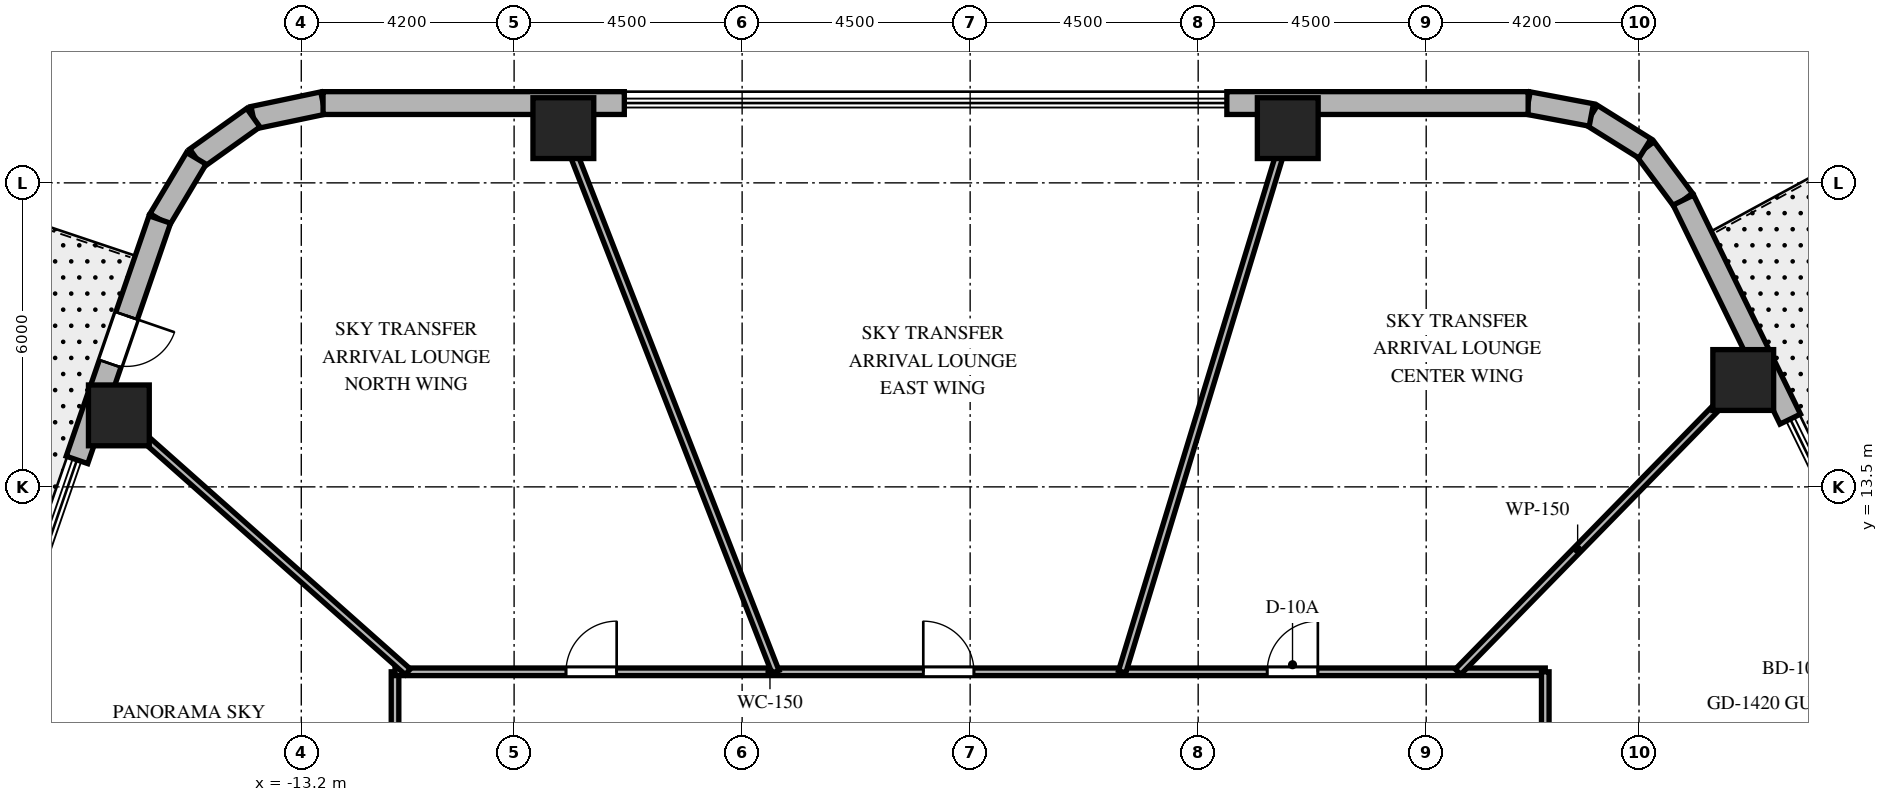
"""IFC4 building model, lengths in metres.
Left out: names, types, materials, properties, quantities, classifications, styles, units other than length and angle.
Written with IfcOpenShell. Run it as: python <this file> out.ifc"""

import sys

from ifc_helpers import new_model, si_unit, direction, frame, frame_2d, origin, origin_2d, place, context, subcontext, project, spatial, rectangle, extrude, element, fill, save


model = new_model("IFC4")
c1 = context("Model", 3, precision=1e-05, world=origin(), true_north=direction((0.0, 1.0)))
c2 = subcontext(c1, "Body", "Model", "MODEL_VIEW")
j1 = project(units=[si_unit("LENGTHUNIT", "METRE"), si_unit("PLANEANGLEUNIT", "RADIAN")], contexts=[c1])
p1 = place(None, origin())
s1 = spatial("IfcSite", under=j1, at=p1, CompositionType="ELEMENT")
p2 = place(p1, origin())
s2 = spatial("IfcBuilding", under=s1, at=p2, CompositionType="ELEMENT")
p3 = place(p2, frame((0.0, 0.0, 139.5)))
s3 = spatial("IfcBuildingStorey", under=s2, at=p3, CompositionType="ELEMENT", Elevation=139.5)
for number, where, z_axis, x_axis in (
    (1, (15.257, 15.609, 0.0), (0.0, 0.0, 1.0), (1.0, 0.0, 0.0)),
    (2, (6.268, 20.58, 0.0), (0.0, 0.0, 1.0), (1.0, 0.0, 0.0)),
    (3, (-8.028, 20.58, 0.0), (0.0, 0.0, 1.0), (1.0, 0.0, 0.0)),
    (4, (-16.8, 14.911, 0.0), (0.0, 0.0, 1.0), (1.0, 0.0, 0.0)),
):
    element("IfcColumn", number, at=place(p3, frame(where, z_axis=z_axis, x_axis=x_axis)), inside=s3, PredefinedType="COLUMN", context=c2, shape_type="SweptSolid", body=[
        extrude(rectangle(XDim=1.2, YDim=1.2, at=origin_2d()), origin(), (0.0, 0.0, 1.0), 4.8),
    ])
p4 = place(p3, frame((14.076, 19.161, 0.0), z_axis=(0.0, 0.0, 1.0), x_axis=(-0.597226657159, 0.802072515412, 0.0)))
e5 = element("IfcWall", 5, at=p4, inside=s3, PredefinedType="SOLIDWALL", context=c2, shape_type="SweptSolid", body=[
    extrude(rectangle(XDim=1.269, YDim=0.45, at=frame_2d((0.635, 0.0))), origin(), (0.0, 0.0, 1.0), 4.5),
])
p5 = place(p3, frame((13.318, 20.179, 0.0), z_axis=(0.0, 0.0, 1.0), x_axis=(-0.848031272749, 0.529946186362, 0.0)))
e6 = element("IfcWall", 6, at=p5, inside=s3, PredefinedType="SOLIDWALL", context=c2, shape_type="SweptSolid", body=[
    extrude(rectangle(XDim=1.248, YDim=0.45, at=frame_2d((0.624, 0.0))), origin(), (0.0, 0.0, 1.0), 4.5),
])
p6 = place(p3, frame((12.259, 20.84, 0.0), z_axis=(0.0, 0.0, 1.0), x_axis=(-0.982730354425, 0.185043374624, 0.0)))
e7 = element("IfcWall", 7, at=p6, inside=s3, PredefinedType="SOLIDWALL", context=c2, shape_type="SweptSolid", body=[
    extrude(rectangle(XDim=1.269, YDim=0.45, at=frame_2d((0.635, 0.0))), origin(), (0.0, 0.0, 1.0), 4.5),
])
p7 = place(p3, frame((-12.771, 21.075, 0.0), z_axis=(0.0, 0.0, 1.0), x_axis=(-0.97874281988, -0.205091424819, 0.0)))
e8 = element("IfcWall", 8, at=p7, inside=s3, PredefinedType="SOLIDWALL", context=c2, shape_type="SweptSolid", body=[
    extrude(rectangle(XDim=1.406, YDim=0.45, at=frame_2d((0.703, 0.0))), origin(), (0.0, 0.0, 1.0), 4.5),
])
p8 = place(p3, frame((-14.146, 20.787, 0.0), z_axis=(0.0, 0.0, 1.0), x_axis=(-0.814162929117, -0.580636482536, 0.0)))
e9 = element("IfcWall", 9, at=p8, inside=s3, PredefinedType="SOLIDWALL", context=c2, shape_type="SweptSolid", body=[
    extrude(rectangle(XDim=1.382, YDim=0.45, at=frame_2d((0.691, 0.0))), origin(), (0.0, 0.0, 1.0), 4.5),
])
p9 = place(p3, frame((-15.272, 19.984, 0.0), z_axis=(0.0, 0.0, 1.0), x_axis=(-0.512579347361, -0.858639862025, 0.0)))
e10 = element("IfcWall", 10, at=p9, inside=s3, PredefinedType="SOLIDWALL", context=c2, shape_type="SweptSolid", body=[
    extrude(rectangle(XDim=1.406, YDim=0.45, at=frame_2d((0.703, 0.0))), origin(), (0.0, 0.0, 1.0), 4.5),
])
p10 = place(p3, frame((16.184, 14.838, 0.0), z_axis=(0.0, 0.0, 1.0), x_axis=(-0.43837962648, 0.898789910428, 0.0)))
e11 = element("IfcWall", 11, at=p10, inside=s3, PredefinedType="SOLIDWALL", context=c2, shape_type="SweptSolid", body=[
    extrude(rectangle(XDim=4.81, YDim=0.45, at=frame_2d((2.405, 0.0))), origin(), (0.0, 0.0, 1.0), 4.5),
])
p11 = place(p3, frame((11.012, 21.075, 0.0), z_axis=(0.0, 0.0, 1.0), x_axis=(-1.0, 0.0, 0.0)))
e12 = element("IfcWall", 12, at=p11, inside=s3, PredefinedType="SOLIDWALL", context=c2, shape_type="SweptSolid", body=[
    extrude(rectangle(XDim=5.946, YDim=0.45, at=frame_2d((2.973, 0.0))), origin(), (0.0, 0.0, 1.0), 4.5),
])
p12 = place(p3, frame((-6.825, 21.075, 0.0), z_axis=(0.0, 0.0, 1.0), x_axis=(-1.0, 0.0, 0.0)))
e13 = element("IfcWall", 13, at=p12, inside=s3, PredefinedType="SOLIDWALL", context=c2, shape_type="SweptSolid", body=[
    extrude(rectangle(XDim=5.946, YDim=0.45, at=frame_2d((2.973, 0.0))), origin(), (0.0, 0.0, 1.0), 4.5),
])
p13 = place(p3, frame((-15.992, 18.777, 0.0), z_axis=(0.0, 0.0, 1.0), x_axis=(-0.325626313688, -0.945498547769, 0.0)))
e14 = element("IfcWall", 14, at=p13, inside=s3, PredefinedType="SOLIDWALL", context=c2, shape_type="SweptSolid", body=[
    extrude(rectangle(XDim=5.018, YDim=0.45, at=frame_2d((2.509, 0.0))), origin(), (0.0, 0.0, 1.0), 4.5),
])
p14 = place(p13, frame((2.009, 0.0, 0.0)))
e15 = element("IfcOpeningElement", 15, at=p14, cuts=e14, PredefinedType="OPENING", context=c2, shape_type="SweptSolid", body=[
    extrude(rectangle(XDim=1.0, YDim=2.15, at=frame_2d((0.5, 1.075))), frame((0.0, 0.235, 0.0), z_axis=(0.0, -1.0, 0.0), x_axis=(1.0, 0.0, 0.0)), (0.0, 0.0, 1.0), 0.47),
])
p15 = place(p3, frame((-11.35, -9.85, 0.0), z_axis=(0.0, 0.0, 1.0), x_axis=(0.0, 1.0, 0.0)))
e16 = element("IfcWall", 16, at=p15, inside=s3, PredefinedType="PARTITIONING", context=c2, shape_type="SweptSolid", body=[
    extrude(rectangle(XDim=19.7, YDim=0.15, at=frame_2d((9.85, 0.0))), origin(), (0.0, 0.0, 1.0), 2.69),
])
p16 = place(p15, frame((15.18, 0.0, 0.0)))
e17 = element("IfcOpeningElement", 17, at=p16, cuts=e16, PredefinedType="OPENING", context=c2, shape_type="SweptSolid", body=[
    extrude(rectangle(XDim=1.0, YDim=2.03, at=frame_2d((0.5, 1.015))), frame((0.0, 0.085, 0.0), z_axis=(0.0, -1.0, 0.0), x_axis=(1.0, 0.0, 0.0)), (0.0, 0.0, 1.0), 0.17),
])
p17 = place(p15, frame((8.811, 0.0, 0.0)))
e18 = element("IfcOpeningElement", 18, at=p17, cuts=e16, PredefinedType="OPENING", context=c2, shape_type="SweptSolid", body=[
    extrude(rectangle(XDim=1.0, YDim=2.03, at=frame_2d((0.5, 1.015))), frame((0.0, 0.085, 0.0), z_axis=(0.0, -1.0, 0.0), x_axis=(1.0, 0.0, 0.0)), (0.0, 0.0, 1.0), 0.17),
])
p18 = place(p15, frame((2.983, 0.0, 0.0)))
e19 = element("IfcOpeningElement", 19, at=p18, cuts=e16, PredefinedType="OPENING", context=c2, shape_type="SweptSolid", body=[
    extrude(rectangle(XDim=1.0, YDim=2.03, at=frame_2d((0.5, 1.015))), frame((0.0, 0.085, 0.0), z_axis=(0.0, -1.0, 0.0), x_axis=(1.0, 0.0, 0.0)), (0.0, 0.0, 1.0), 0.17),
])
p19 = place(p3, frame((-11.35, 9.85, 0.0), z_axis=(0.0, 0.0, 1.0), x_axis=(1.0, 0.0, 0.0)))
e20 = element("IfcWall", 20, at=p19, inside=s3, PredefinedType="PARTITIONING", context=c2, shape_type="SweptSolid", body=[
    extrude(rectangle(XDim=22.7, YDim=0.15, at=frame_2d((11.35, 0.0))), origin(), (0.0, 0.0, 1.0), 2.69),
])
p20 = place(p19, frame((17.212, 0.0, 0.0)))
e21 = element("IfcOpeningElement", 21, at=p20, cuts=e20, PredefinedType="OPENING", context=c2, shape_type="SweptSolid", body=[
    extrude(rectangle(XDim=1.0, YDim=2.03, at=frame_2d((0.5, 1.015))), frame((0.0, 0.085, 0.0), z_axis=(0.0, -1.0, 0.0), x_axis=(1.0, 0.0, 0.0)), (0.0, 0.0, 1.0), 0.17),
])
p21 = place(p19, frame((10.425, 0.0, 0.0)))
e22 = element("IfcOpeningElement", 22, at=p21, cuts=e20, PredefinedType="OPENING", context=c2, shape_type="SweptSolid", body=[
    extrude(rectangle(XDim=1.0, YDim=2.03, at=frame_2d((0.5, 1.015))), frame((0.0, 0.085, 0.0), z_axis=(0.0, -1.0, 0.0), x_axis=(1.0, 0.0, 0.0)), (0.0, 0.0, 1.0), 0.17),
])
p22 = place(p19, frame((3.374, 0.0, 0.0)))
e23 = element("IfcOpeningElement", 23, at=p22, cuts=e20, PredefinedType="OPENING", context=c2, shape_type="SweptSolid", body=[
    extrude(rectangle(XDim=1.0, YDim=2.03, at=frame_2d((0.5, 1.015))), frame((0.0, 0.085, 0.0), z_axis=(0.0, -1.0, 0.0), x_axis=(1.0, 0.0, 0.0)), (0.0, 0.0, 1.0), 0.17),
])
p23 = place(p3, frame((11.35, 9.85, 0.0), z_axis=(0.0, 0.0, 1.0), x_axis=(0.0, -1.0, 0.0)))
e24 = element("IfcWall", 24, at=p23, inside=s3, PredefinedType="PARTITIONING", context=c2, shape_type="SweptSolid", body=[
    extrude(rectangle(XDim=19.7, YDim=0.15, at=frame_2d((9.85, 0.0))), origin(), (0.0, 0.0, 1.0), 2.69),
])
p24 = place(p23, frame((2.983, 0.0, 0.0)))
e25 = element("IfcOpeningElement", 25, at=p24, cuts=e24, PredefinedType="OPENING", context=c2, shape_type="SweptSolid", body=[
    extrude(rectangle(XDim=1.0, YDim=2.03, at=frame_2d((0.5, 1.015))), frame((0.0, 0.085, 0.0), z_axis=(0.0, -1.0, 0.0), x_axis=(1.0, 0.0, 0.0)), (0.0, 0.0, 1.0), 0.17),
])
p25 = place(p23, frame((15.18, 0.0, 0.0)))
e26 = element("IfcOpeningElement", 26, at=p25, cuts=e24, PredefinedType="OPENING", context=c2, shape_type="SweptSolid", body=[
    extrude(rectangle(XDim=1.0, YDim=2.03, at=frame_2d((0.5, 1.015))), frame((0.0, 0.085, 0.0), z_axis=(0.0, -1.0, 0.0), x_axis=(1.0, 0.0, 0.0)), (0.0, 0.0, 1.0), 0.17),
])
p26 = place(p23, frame((8.811, 0.0, 0.0)))
e27 = element("IfcOpeningElement", 27, at=p26, cuts=e24, PredefinedType="OPENING", context=c2, shape_type="SweptSolid", body=[
    extrude(rectangle(XDim=1.0, YDim=2.03, at=frame_2d((0.5, 1.015))), frame((0.0, 0.085, 0.0), z_axis=(0.0, -1.0, 0.0), x_axis=(1.0, 0.0, 0.0)), (0.0, 0.0, 1.0), 0.17),
])
p27 = place(p3, frame((9.628, 9.85, 0.0), z_axis=(0.0, 0.0, 1.0), x_axis=(0.698992824326, 0.715128681805, 0.0)))
e28 = element("IfcWall", 28, at=p27, inside=s3, PredefinedType="PARTITIONING", context=c2, shape_type="SweptSolid", body=[
    extrude(rectangle(XDim=8.579, YDim=0.15, at=frame_2d((4.29, 0.0))), origin(), (0.0, 0.0, 1.0), 2.69),
])
p28 = place(p3, frame((3.0, 9.85, 0.0), z_axis=(0.0, 0.0, 1.0), x_axis=(0.291352035382, 0.95661590593, 0.0)))
e29 = element("IfcWall", 29, at=p28, inside=s3, PredefinedType="PARTITIONING", context=c2, shape_type="SweptSolid", body=[
    extrude(rectangle(XDim=11.734, YDim=0.15, at=frame_2d((5.867, 0.0))), origin(), (0.0, 0.0, 1.0), 2.69),
])
p29 = place(p3, frame((-3.842, 9.85, 0.0), z_axis=(0.0, 0.0, 1.0), x_axis=(-0.363432685593, 0.931620460833, 0.0)))
e30 = element("IfcWall", 30, at=p29, inside=s3, PredefinedType="PARTITIONING", context=c2, shape_type="SweptSolid", body=[
    extrude(rectangle(XDim=12.049, YDim=0.15, at=frame_2d((6.024, 0.0))), origin(), (0.0, 0.0, 1.0), 2.69),
])
p30 = place(p3, frame((-11.098, 9.85, 0.0), z_axis=(0.0, 0.0, 1.0), x_axis=(-0.747904295103, 0.663806572253, 0.0)))
e31 = element("IfcWall", 31, at=p30, inside=s3, PredefinedType="PARTITIONING", context=c2, shape_type="SweptSolid", body=[
    extrude(rectangle(XDim=8.16, YDim=0.15, at=frame_2d((4.08, 0.0))), origin(), (0.0, 0.0, 1.0), 2.69),
])
p31 = place(p14, origin())
e32 = element("IfcDoor", 32, at=p31, inside=s3, OperationType="SINGLE_SWING_LEFT", PredefinedType="DOOR", context=c2, shape_type="SweptSolid", body=[
    extrude(rectangle(XDim=1.0, YDim=2.15, at=frame_2d((0.5, 1.075))), frame((0.0, 0.025, 0.0), z_axis=(0.0, -1.0, 0.0), x_axis=(1.0, 0.0, 0.0)), (0.0, 0.0, 1.0), 0.05),
])
fill(e15, e32)
p32 = place(p20, origin())
e33 = element("IfcDoor", 33, at=p32, inside=s3, OperationType="SINGLE_SWING_RIGHT", PredefinedType="DOOR", context=c2, shape_type="SweptSolid", body=[
    extrude(rectangle(XDim=1.0, YDim=2.03, at=frame_2d((0.5, 1.015))), frame((0.0, 0.025, 0.0), z_axis=(0.0, -1.0, 0.0), x_axis=(1.0, 0.0, 0.0)), (0.0, 0.0, 1.0), 0.05),
])
fill(e21, e33)
p33 = place(p21, origin())
e34 = element("IfcDoor", 34, at=p33, inside=s3, OperationType="SINGLE_SWING_LEFT", PredefinedType="DOOR", context=c2, shape_type="SweptSolid", body=[
    extrude(rectangle(XDim=1.0, YDim=2.03, at=frame_2d((0.5, 1.015))), frame((0.0, 0.025, 0.0), z_axis=(0.0, -1.0, 0.0), x_axis=(1.0, 0.0, 0.0)), (0.0, 0.0, 1.0), 0.05),
])
fill(e22, e34)
p34 = place(p22, origin())
e35 = element("IfcDoor", 35, at=p34, inside=s3, OperationType="SINGLE_SWING_RIGHT", PredefinedType="DOOR", context=c2, shape_type="SweptSolid", body=[
    extrude(rectangle(XDim=1.0, YDim=2.03, at=frame_2d((0.5, 1.015))), frame((0.0, 0.025, 0.0), z_axis=(0.0, -1.0, 0.0), x_axis=(1.0, 0.0, 0.0)), (0.0, 0.0, 1.0), 0.05),
])
fill(e23, e35)
save(model, sys.argv[1])
